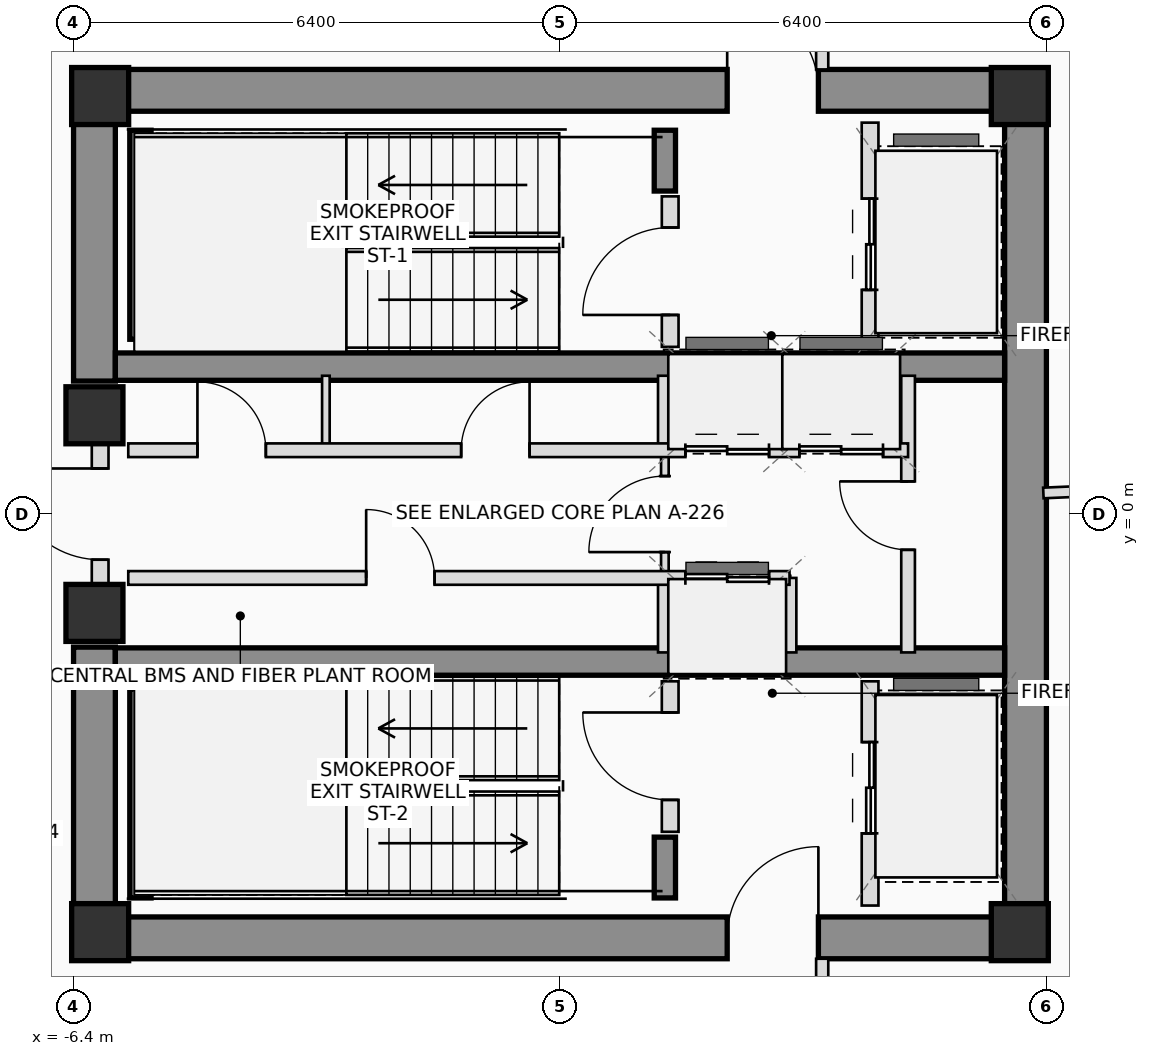
"""IFC4 building model, lengths in metres.
Left out: names, types, materials, properties, quantities, classifications, styles, units other than length and angle.
Written with IfcOpenShell. Run it as: python <this file> out.ifc"""

import sys

from ifc_helpers import new_model, si_unit, direction, frame, frame_2d, origin, origin_2d, place, context, subcontext, project, spatial, rectangle, extrude, source, transform, mapped, element, fill, save


model = new_model("IFC4")
c1 = context("Model", 3, precision=1e-05, world=origin(), true_north=direction((0.0, 1.0)))
c2 = subcontext(c1, "Body", "Model", "MODEL_VIEW")
j1 = project(units=[si_unit("LENGTHUNIT", "METRE"), si_unit("PLANEANGLEUNIT", "RADIAN")], contexts=[c1])
p1 = place(None, origin())
s1 = spatial("IfcSite", under=j1, at=p1, CompositionType="ELEMENT")
p2 = place(p1, origin())
s2 = spatial("IfcBuilding", under=s1, at=p2, CompositionType="ELEMENT")
p3 = place(p2, frame((0.0, 0.0, 281.35)))
s3 = spatial("IfcBuildingStorey", under=s2, at=p3, CompositionType="ELEMENT", Elevation=281.35)
m1 = source(origin(), c2, "Body", "SweptSolid", [
    extrude(rectangle(XDim=0.75, YDim=0.75, at=origin_2d()), origin(), (0.0, 0.0, 1.0), 3.4),
])
for number, where, z_axis, x_axis in (
    (1, (-6.05, -5.5, 0.0), (0.0, 0.0, 1.0), (1.0, 0.0, 0.0)),
    (2, (6.05, -5.5, 0.0), (0.0, 0.0, 1.0), (1.0, 0.0, 0.0)),
    (3, (6.05, 5.5, 0.0), (0.0, 0.0, 1.0), (1.0, 0.0, 0.0)),
    (4, (-6.05, 5.5, 0.0), (0.0, 0.0, 1.0), (1.0, 0.0, 0.0)),
):
    element("IfcColumn", number, at=place(p3, frame(where, z_axis=z_axis, x_axis=x_axis)), inside=s3, PredefinedType="COLUMN", context=c2, shape_type="MappedRepresentation", body=[
        mapped(m1, transform((0.0, 0.0, 0.0), scale=1.0)),
    ])
p4 = place(p3, frame((-6.4, 5.575, 0.0), z_axis=(0.0, 0.0, 1.0), x_axis=(1.0, 0.0, 0.0)))
e5 = element("IfcWall", 5, at=p4, inside=s3, PredefinedType="SHEAR", context=c2, shape_type="SweptSolid", body=[
    extrude(rectangle(XDim=12.8, YDim=0.55, at=frame_2d((6.4, 0.0))), origin(), (0.0, 0.0, 1.0), 3.4),
])
p5 = place(p4, frame((8.6, 0.0, 0.0)))
e6 = element("IfcOpeningElement", 6, at=p5, cuts=e5, PredefinedType="OPENING", context=c2, shape_type="SweptSolid", body=[
    extrude(rectangle(XDim=1.2, YDim=2.2, at=frame_2d((0.6, 1.1))), frame((0.0, 0.285, 0.0), z_axis=(0.0, -1.0, 0.0), x_axis=(1.0, 0.0, 0.0)), (0.0, 0.0, 1.0), 0.57),
])
p6 = place(p3, frame((-6.4, -5.575, 0.0), z_axis=(0.0, 0.0, 1.0), x_axis=(1.0, 0.0, 0.0)))
e7 = element("IfcWall", 7, at=p6, inside=s3, PredefinedType="SHEAR", context=c2, shape_type="SweptSolid", body=[
    extrude(rectangle(XDim=12.8, YDim=0.55, at=frame_2d((6.4, 0.0))), origin(), (0.0, 0.0, 1.0), 3.4),
])
p7 = place(p6, frame((8.6, 0.0, 0.0)))
e8 = element("IfcOpeningElement", 8, at=p7, cuts=e7, PredefinedType="OPENING", context=c2, shape_type="SweptSolid", body=[
    extrude(rectangle(XDim=1.2, YDim=2.2, at=frame_2d((0.6, 1.1))), frame((0.0, 0.285, 0.0), z_axis=(0.0, -1.0, 0.0), x_axis=(1.0, 0.0, 0.0)), (0.0, 0.0, 1.0), 0.57),
])
p8 = place(p3, frame((6.125, -5.3, 0.0), z_axis=(0.0, 0.0, 1.0), x_axis=(0.0, 1.0, 0.0)))
e9 = element("IfcWall", 9, at=p8, inside=s3, PredefinedType="SHEAR", context=c2, shape_type="SweptSolid", body=[
    extrude(rectangle(XDim=10.6, YDim=0.55, at=frame_2d((5.3, 0.0))), origin(), (0.0, 0.0, 1.0), 3.4),
])
for number, where, z_axis, x_axis in (
    (10, (-6.125, -5.3, 0.0), (0.0, 0.0, 1.0), (0.0, 1.0, 0.0)),
    (11, (-6.125, 1.75, 0.0), (0.0, 0.0, 1.0), (0.0, 1.0, 0.0)),
):
    element("IfcWall", number, at=place(p3, frame(where, z_axis=z_axis, x_axis=x_axis)), inside=s3, PredefinedType="SHEAR", context=c2, shape_type="SweptSolid", body=[
        extrude(rectangle(XDim=3.55, YDim=0.55, at=frame_2d((1.775, 0.0))), origin(), (0.0, 0.0, 1.0), 3.4),
    ])
for number, where, z_axis, x_axis in (
    (12, (-5.85, 1.94, 0.0), (0.0, 0.0, 1.0), (1.0, 0.0, 0.0)),
    (13, (-5.85, -1.94, 0.0), (0.0, 0.0, 1.0), (1.0, 0.0, 0.0)),
):
    element("IfcWall", number, at=place(p3, frame(where, z_axis=z_axis, x_axis=x_axis)), inside=s3, PredefinedType="SHEAR", context=c2, shape_type="SweptSolid", body=[
        extrude(rectangle(XDim=11.7, YDim=0.36, at=frame_2d((5.85, 0.0))), origin(), (0.0, 0.0, 1.0), 3.4),
    ])
p9 = place(p3, frame((-5.52, 2.3, 0.0), z_axis=(0.0, 0.0, 1.0), x_axis=(0.0, 1.0, 0.0)))
e14 = element("IfcWall", 14, at=p9, inside=s3, PredefinedType="SHEAR", context=c2, shape_type="SweptSolid", body=[
    extrude(rectangle(XDim=2.75, YDim=0.28, at=frame_2d((1.375, 0.0))), origin(), (0.0, 0.0, 1.0), 3.4),
])
p10 = place(p3, frame((1.38, 4.25, 0.0), z_axis=(0.0, 0.0, 1.0), x_axis=(0.0, 1.0, 0.0)))
e15 = element("IfcWall", 15, at=p10, inside=s3, PredefinedType="SHEAR", context=c2, shape_type="SweptSolid", body=[
    extrude(rectangle(XDim=0.8, YDim=0.28, at=frame_2d((0.4, 0.0))), origin(), (0.0, 0.0, 1.0), 3.4),
])
p11 = place(p3, frame((-5.52, -5.05, 0.0), z_axis=(0.0, 0.0, 1.0), x_axis=(0.0, 1.0, 0.0)))
e16 = element("IfcWall", 16, at=p11, inside=s3, PredefinedType="SHEAR", context=c2, shape_type="SweptSolid", body=[
    extrude(rectangle(XDim=2.75, YDim=0.28, at=frame_2d((1.375, 0.0))), origin(), (0.0, 0.0, 1.0), 3.4),
])
p12 = place(p3, frame((1.38, -5.05, 0.0), z_axis=(0.0, 0.0, 1.0), x_axis=(0.0, 1.0, 0.0)))
e17 = element("IfcWall", 17, at=p12, inside=s3, PredefinedType="SHEAR", context=c2, shape_type="SweptSolid", body=[
    extrude(rectangle(XDim=0.8, YDim=0.28, at=frame_2d((0.4, 0.0))), origin(), (0.0, 0.0, 1.0), 3.4),
])
for number, where, z_axis, x_axis in (
    (18, (-6.125, -1.3, 0.0), (0.0, 0.0, 1.0), (1.0, 0.0, 0.0)),
    (19, (-6.125, 1.3, 0.0), (0.0, 0.0, 1.0), (1.0, 0.0, 0.0)),
):
    element("IfcColumn", number, at=place(p3, frame(where, z_axis=z_axis, x_axis=x_axis)), inside=s3, PredefinedType="COLUMN", context=c2, shape_type="MappedRepresentation", body=[
        mapped(m1, transform((0.0, 0.0, 0.0), scale=1.0)),
    ])
p13 = place(p3, frame((-6.05, -0.95, 0.0), z_axis=(0.0, 0.0, 1.0), x_axis=(0.0, 1.0, 0.0)))
e20 = element("IfcWall", 20, at=p13, inside=s3, PredefinedType="PLUMBINGWALL", context=c2, shape_type="SweptSolid", body=[
    extrude(rectangle(XDim=1.9, YDim=0.22, at=frame_2d((0.95, 0.0))), origin(), (0.0, 0.0, 1.0), 2.14),
])
p14 = place(p13, frame((0.35, 0.0, 0.0)))
e21 = element("IfcOpeningElement", 21, at=p14, cuts=e20, PredefinedType="OPENING", context=c2, shape_type="SweptSolid", body=[
    extrude(rectangle(XDim=1.2, YDim=2.2, at=frame_2d((0.6, 1.1))), frame((0.0, 0.12, 0.0), z_axis=(0.0, -1.0, 0.0), x_axis=(1.0, 0.0, 0.0)), (0.0, 0.0, 1.0), 0.24),
])
p15 = place(p3, frame((1.45, 2.2, 0.0), z_axis=(0.0, 0.0, 1.0), x_axis=(0.0, 1.0, 0.0)))
e22 = element("IfcWall", 22, at=p15, inside=s3, PredefinedType="PLUMBINGWALL", context=c2, shape_type="SweptSolid", body=[
    extrude(rectangle(XDim=1.98, YDim=0.22, at=frame_2d((0.99, 0.0))), origin(), (0.0, 0.0, 1.0), 3.16),
])
p16 = place(p15, frame((0.42, 0.0, 0.0)))
e23 = element("IfcOpeningElement", 23, at=p16, cuts=e22, PredefinedType="OPENING", context=c2, shape_type="SweptSolid", body=[
    extrude(rectangle(XDim=1.15, YDim=2.15, at=frame_2d((0.575, 1.075))), frame((0.0, 0.12, 0.0), z_axis=(0.0, -1.0, 0.0), x_axis=(1.0, 0.0, 0.0)), (0.0, 0.0, 1.0), 0.24),
])
p17 = place(p3, frame((4.08, 2.2, 0.0), z_axis=(0.0, 0.0, 1.0), x_axis=(0.0, 1.0, 0.0)))
e24 = element("IfcWall", 24, at=p17, inside=s3, PredefinedType="PLUMBINGWALL", context=c2, shape_type="SweptSolid", body=[
    extrude(rectangle(XDim=2.95, YDim=0.22, at=frame_2d((1.475, 0.0))), origin(), (0.0, 0.0, 1.0), 3.16),
])
p18 = place(p17, frame((0.75, 0.0, 0.0)))
e25 = element("IfcOpeningElement", 25, at=p18, cuts=e24, PredefinedType="OPENING", context=c2, shape_type="SweptSolid", body=[
    extrude(rectangle(XDim=1.2, YDim=2.25, at=frame_2d((0.6, 1.125))), frame((0.0, 0.12, 0.0), z_axis=(0.0, -1.0, 0.0), x_axis=(1.0, 0.0, 0.0)), (0.0, 0.0, 1.0), 0.24),
])
p19 = place(p3, frame((1.45, -4.18, 0.0), z_axis=(0.0, 0.0, 1.0), x_axis=(0.0, 1.0, 0.0)))
e26 = element("IfcWall", 26, at=p19, inside=s3, PredefinedType="PLUMBINGWALL", context=c2, shape_type="SweptSolid", body=[
    extrude(rectangle(XDim=1.98, YDim=0.22, at=frame_2d((0.99, 0.0))), origin(), (0.0, 0.0, 1.0), 3.16),
])
p20 = place(p19, frame((0.42, 0.0, 0.0)))
e27 = element("IfcOpeningElement", 27, at=p20, cuts=e26, PredefinedType="OPENING", context=c2, shape_type="SweptSolid", body=[
    extrude(rectangle(XDim=1.15, YDim=2.15, at=frame_2d((0.575, 1.075))), frame((0.0, 0.12, 0.0), z_axis=(0.0, -1.0, 0.0), x_axis=(1.0, 0.0, 0.0)), (0.0, 0.0, 1.0), 0.24),
])
p21 = place(p3, frame((4.08, -5.15, 0.0), z_axis=(0.0, 0.0, 1.0), x_axis=(0.0, 1.0, 0.0)))
e28 = element("IfcWall", 28, at=p21, inside=s3, PredefinedType="PLUMBINGWALL", context=c2, shape_type="SweptSolid", body=[
    extrude(rectangle(XDim=2.95, YDim=0.22, at=frame_2d((1.475, 0.0))), origin(), (0.0, 0.0, 1.0), 3.16),
])
p22 = place(p21, frame((0.95, 0.0, 0.0)))
e29 = element("IfcOpeningElement", 29, at=p22, cuts=e28, PredefinedType="OPENING", context=c2, shape_type="SweptSolid", body=[
    extrude(rectangle(XDim=1.2, YDim=2.25, at=frame_2d((0.6, 1.125))), frame((0.0, 0.12, 0.0), z_axis=(0.0, -1.0, 0.0), x_axis=(1.0, 0.0, 0.0)), (0.0, 0.0, 1.0), 0.24),
])
p23 = place(p3, frame((1.38, -0.84, 0.0), z_axis=(0.0, 0.0, 1.0), x_axis=(0.0, 1.0, 0.0)))
e30 = element("IfcWall", 30, at=p23, inside=s3, PredefinedType="PARTITIONING", context=c2, shape_type="SweptSolid", body=[
    extrude(rectangle(XDim=1.68, YDim=0.1, at=frame_2d((0.84, 0.0))), origin(), (0.0, 0.0, 1.0), 3.16),
])
p24 = place(p23, frame((0.34, 0.0, 0.0)))
e31 = element("IfcOpeningElement", 31, at=p24, cuts=e30, PredefinedType="OPENING", context=c2, shape_type="SweptSolid", body=[
    extrude(rectangle(XDim=1.0, YDim=2.25, at=frame_2d((0.5, 1.125))), frame((0.0, 0.06, 0.0), z_axis=(0.0, -1.0, 0.0), x_axis=(1.0, 0.0, 0.0)), (0.0, 0.0, 1.0), 0.12),
])
p25 = place(p3, frame((-3.08, 0.84, 0.0), z_axis=(0.0, 0.0, 1.0), x_axis=(0.0, 1.0, 0.0)))
e32 = element("IfcWall", 32, at=p25, inside=s3, PredefinedType="PARTITIONING", context=c2, shape_type="SweptSolid", body=[
    extrude(rectangle(XDim=0.98, YDim=0.1, at=frame_2d((0.49, 0.0))), origin(), (0.0, 0.0, 1.0), 3.16),
])
for number, where, z_axis, x_axis in (
    (33, (1.38, 0.84, 0.0), (0.0, 0.0, 1.0), (0.0, 1.0, 0.0)),
    (34, (1.38, -1.82, 0.0), (0.0, 0.0, 1.0), (0.0, 1.0, 0.0)),
    (35, (3.02, 0.84, 0.0), (0.0, 0.0, 1.0), (0.0, 1.0, 0.0)),
    (36, (4.38, 0.84, 0.0), (0.0, 0.0, 1.0), (0.0, 1.0, 0.0)),
    (37, (3.02, -1.82, 0.0), (0.0, 0.0, 1.0), (0.0, 1.0, 0.0)),
):
    element("IfcWall", number, at=place(p3, frame(where, z_axis=z_axis, x_axis=x_axis)), inside=s3, PredefinedType="PLUMBINGWALL", context=c2, shape_type="SweptSolid", body=[
        extrude(rectangle(XDim=0.98, YDim=0.18, at=frame_2d((0.49, 0.0))), origin(), (0.0, 0.0, 1.0), 3.16),
    ])
p26 = place(p3, frame((4.58, -1.82, 0.0), z_axis=(0.0, 0.0, 1.0), x_axis=(0.0, 1.0, 0.0)))
e38 = element("IfcWall", 38, at=p26, inside=s3, PredefinedType="PLUMBINGWALL", context=c2, shape_type="SweptSolid", body=[
    extrude(rectangle(XDim=3.64, YDim=0.18, at=frame_2d((1.82, 0.0))), origin(), (0.0, 0.0, 1.0), 3.16),
])
p27 = place(p26, frame((1.35, 0.0, 0.0)))
e39 = element("IfcOpeningElement", 39, at=p27, cuts=e38, PredefinedType="OPENING", context=c2, shape_type="SweptSolid", body=[
    extrude(rectangle(XDim=0.9, YDim=2.05, at=frame_2d((0.45, 1.025))), frame((0.0, 0.1, 0.0), z_axis=(0.0, -1.0, 0.0), x_axis=(1.0, 0.0, 0.0)), (0.0, 0.0, 1.0), 0.2),
])
p28 = place(p3, frame((-5.68, 0.84, 0.0), z_axis=(0.0, 0.0, 1.0), x_axis=(1.0, 0.0, 0.0)))
e40 = element("IfcWall", 40, at=p28, inside=s3, PredefinedType="PLUMBINGWALL", context=c2, shape_type="SweptSolid", body=[
    extrude(rectangle(XDim=10.26, YDim=0.18, at=frame_2d((5.13, 0.0))), origin(), (0.0, 0.0, 1.0), 3.16),
])
p29 = place(p28, frame((0.91, 0.0, 0.0)))
e41 = element("IfcOpeningElement", 41, at=p29, cuts=e40, PredefinedType="OPENING", context=c2, shape_type="SweptSolid", body=[
    extrude(rectangle(XDim=0.9, YDim=2.05, at=frame_2d((0.45, 1.025))), frame((0.0, 0.1, 0.0), z_axis=(0.0, -1.0, 0.0), x_axis=(1.0, 0.0, 0.0)), (0.0, 0.0, 1.0), 0.2),
])
p30 = place(p28, frame((4.38, 0.0, 0.0)))
e42 = element("IfcOpeningElement", 42, at=p30, cuts=e40, PredefinedType="OPENING", context=c2, shape_type="SweptSolid", body=[
    extrude(rectangle(XDim=0.9, YDim=2.05, at=frame_2d((0.45, 1.025))), frame((0.0, 0.1, 0.0), z_axis=(0.0, -1.0, 0.0), x_axis=(1.0, 0.0, 0.0)), (0.0, 0.0, 1.0), 0.2),
])
p31 = place(p28, frame((7.33, 0.0, 0.0)))
e43 = element("IfcOpeningElement", 43, at=p31, cuts=e40, PredefinedType="OPENING", context=c2, shape_type="SweptSolid", body=[
    extrude(rectangle(XDim=1.1, YDim=2.2, at=frame_2d((0.55, 1.1))), frame((0.0, 0.1, 0.0), z_axis=(0.0, -1.0, 0.0), x_axis=(1.0, 0.0, 0.0)), (0.0, 0.0, 1.0), 0.2),
])
p32 = place(p28, frame((8.83, 0.0, 0.0)))
e44 = element("IfcOpeningElement", 44, at=p32, cuts=e40, PredefinedType="OPENING", context=c2, shape_type="SweptSolid", body=[
    extrude(rectangle(XDim=1.1, YDim=2.2, at=frame_2d((0.55, 1.1))), frame((0.0, 0.1, 0.0), z_axis=(0.0, -1.0, 0.0), x_axis=(1.0, 0.0, 0.0)), (0.0, 0.0, 1.0), 0.2),
])
p33 = place(p3, frame((-5.68, -0.84, 0.0), z_axis=(0.0, 0.0, 1.0), x_axis=(1.0, 0.0, 0.0)))
e45 = element("IfcWall", 45, at=p33, inside=s3, PredefinedType="PLUMBINGWALL", context=c2, shape_type="SweptSolid", body=[
    extrude(rectangle(XDim=8.7, YDim=0.18, at=frame_2d((4.35, 0.0))), origin(), (0.0, 0.0, 1.0), 3.16),
])
p34 = place(p33, frame((3.13, 0.0, 0.0)))
e46 = element("IfcOpeningElement", 46, at=p34, cuts=e45, PredefinedType="OPENING", context=c2, shape_type="SweptSolid", body=[
    extrude(rectangle(XDim=0.9, YDim=2.05, at=frame_2d((0.45, 1.025))), frame((0.0, 0.1, 0.0), z_axis=(0.0, -1.0, 0.0), x_axis=(1.0, 0.0, 0.0)), (0.0, 0.0, 1.0), 0.2),
])
p35 = place(p33, frame((7.33, 0.0, 0.0)))
e47 = element("IfcOpeningElement", 47, at=p35, cuts=e45, PredefinedType="OPENING", context=c2, shape_type="SweptSolid", body=[
    extrude(rectangle(XDim=1.1, YDim=2.2, at=frame_2d((0.55, 1.1))), frame((0.0, 0.1, 0.0), z_axis=(0.0, -1.0, 0.0), x_axis=(1.0, 0.0, 0.0)), (0.0, 0.0, 1.0), 0.2),
])
p36 = place(p3, frame((3.45, 7.49, 0.0), z_axis=(0.0, 0.0, 1.0), x_axis=(0.0, -1.0, 0.0)))
e48 = element("IfcWall", 48, at=p36, inside=s3, PredefinedType="PARTITIONING", context=c2, shape_type="SweptSolid", body=[
    extrude(rectangle(XDim=1.64, YDim=0.16, at=frame_2d((0.82, 0.0))), origin(), (0.0, 0.0, 1.0), 2.765),
])
p37 = place(p3, frame((3.45, -5.85, 0.0), z_axis=(0.0, 0.0, 1.0), x_axis=(0.0, -1.0, 0.0)))
e49 = element("IfcWall", 49, at=p37, inside=s3, PredefinedType="PARTITIONING", context=c2, shape_type="SweptSolid", body=[
    extrude(rectangle(XDim=1.64, YDim=0.16, at=frame_2d((0.82, 0.0))), origin(), (0.0, 0.0, 1.0), 3.16),
])
p38 = place(p37, frame((0.32, 0.0, 0.0)))
e50 = element("IfcOpeningElement", 50, at=p38, cuts=e49, PredefinedType="OPENING", context=c2, shape_type="SweptSolid", body=[
    extrude(rectangle(XDim=1.0, YDim=2.25, at=frame_2d((0.5, 1.125))), frame((0.0, 0.09, 0.0), z_axis=(0.0, -1.0, 0.0), x_axis=(1.0, 0.0, 0.0)), (0.0, 0.0, 1.0), 0.18),
])
p39 = place(p3, frame((6.36, 0.278, 0.0), z_axis=(0.0, 0.0, 1.0), x_axis=(0.999047617824, 0.043633213494, 0.0)))
e51 = element("IfcWall", 51, at=p39, inside=s3, PredefinedType="PARTITIONING", context=c2, shape_type="SweptSolid", body=[
    extrude(rectangle(XDim=13.406, YDim=0.14, at=frame_2d((6.703, 0.0))), origin(), (0.0, 0.0, 1.0), 2.565),
])
p40 = place(p5, origin())
e52 = element("IfcDoor", 52, at=p40, inside=s3, OperationType="SINGLE_SWING_LEFT", PredefinedType="DOOR", context=c2, shape_type="SweptSolid", body=[
    extrude(rectangle(XDim=1.2, YDim=2.2, at=frame_2d((0.6, 1.1))), frame((0.0, 0.025, 0.0), z_axis=(0.0, -1.0, 0.0), x_axis=(1.0, 0.0, 0.0)), (0.0, 0.0, 1.0), 0.05),
])
fill(e6, e52)
p41 = place(p7, origin())
e53 = element("IfcDoor", 53, at=p41, inside=s3, OperationType="SINGLE_SWING_RIGHT", PredefinedType="DOOR", context=c2, shape_type="SweptSolid", body=[
    extrude(rectangle(XDim=1.2, YDim=2.2, at=frame_2d((0.6, 1.1))), frame((0.0, 0.025, 0.0), z_axis=(0.0, -1.0, 0.0), x_axis=(1.0, 0.0, 0.0)), (0.0, 0.0, 1.0), 0.05),
])
fill(e8, e53)
p42 = place(p14, origin())
e54 = element("IfcDoor", 54, at=p42, inside=s3, OperationType="SINGLE_SWING_RIGHT", PredefinedType="DOOR", context=c2, shape_type="SweptSolid", body=[
    extrude(rectangle(XDim=1.2, YDim=2.2, at=frame_2d((0.6, 1.1))), frame((0.0, 0.025, 0.0), z_axis=(0.0, -1.0, 0.0), x_axis=(1.0, 0.0, 0.0)), (0.0, 0.0, 1.0), 0.05),
])
fill(e21, e54)
p43 = place(p16, origin())
e55 = element("IfcDoor", 55, at=p43, inside=s3, OperationType="SINGLE_SWING_LEFT", PredefinedType="DOOR", context=c2, shape_type="SweptSolid", body=[
    extrude(rectangle(XDim=1.15, YDim=2.15, at=frame_2d((0.575, 1.075))), frame((0.0, 0.025, 0.0), z_axis=(0.0, -1.0, 0.0), x_axis=(1.0, 0.0, 0.0)), (0.0, 0.0, 1.0), 0.05),
])
fill(e23, e55)
p44 = place(p18, origin())
e56 = element("IfcDoor", 56, at=p44, inside=s3, OperationType="DOUBLE_DOOR_SLIDING", PredefinedType="DOOR", context=c2, shape_type="SweptSolid", body=[
    extrude(rectangle(XDim=1.2, YDim=2.25, at=frame_2d((0.6, 1.125))), frame((0.0, 0.025, 0.0), z_axis=(0.0, -1.0, 0.0), x_axis=(1.0, 0.0, 0.0)), (0.0, 0.0, 1.0), 0.05),
])
fill(e25, e56)
p45 = place(p20, origin())
e57 = element("IfcDoor", 57, at=p45, inside=s3, OperationType="SINGLE_SWING_RIGHT", PredefinedType="DOOR", context=c2, shape_type="SweptSolid", body=[
    extrude(rectangle(XDim=1.15, YDim=2.15, at=frame_2d((0.575, 1.075))), frame((0.0, 0.025, 0.0), z_axis=(0.0, -1.0, 0.0), x_axis=(1.0, 0.0, 0.0)), (0.0, 0.0, 1.0), 0.05),
])
fill(e27, e57)
p46 = place(p22, origin())
e58 = element("IfcDoor", 58, at=p46, inside=s3, OperationType="DOUBLE_DOOR_SLIDING", PredefinedType="DOOR", context=c2, shape_type="SweptSolid", body=[
    extrude(rectangle(XDim=1.2, YDim=2.25, at=frame_2d((0.6, 1.125))), frame((0.0, 0.025, 0.0), z_axis=(0.0, -1.0, 0.0), x_axis=(1.0, 0.0, 0.0)), (0.0, 0.0, 1.0), 0.05),
])
fill(e29, e58)
p47 = place(p24, origin())
e59 = element("IfcDoor", 59, at=p47, inside=s3, OperationType="SINGLE_SWING_LEFT", PredefinedType="DOOR", context=c2, shape_type="SweptSolid", body=[
    extrude(rectangle(XDim=1.0, YDim=2.25, at=frame_2d((0.5, 1.125))), frame((0.0, 0.025, 0.0), z_axis=(0.0, -1.0, 0.0), x_axis=(1.0, 0.0, 0.0)), (0.0, 0.0, 1.0), 0.05),
])
fill(e31, e59)
p48 = place(p27, origin())
e60 = element("IfcDoor", 60, at=p48, inside=s3, OperationType="SINGLE_SWING_RIGHT", PredefinedType="DOOR", context=c2, shape_type="SweptSolid", body=[
    extrude(rectangle(XDim=0.9, YDim=2.05, at=frame_2d((0.45, 1.025))), frame((0.0, 0.025, 0.0), z_axis=(0.0, -1.0, 0.0), x_axis=(1.0, 0.0, 0.0)), (0.0, 0.0, 1.0), 0.05),
])
fill(e39, e60)
p49 = place(p29, origin())
e61 = element("IfcDoor", 61, at=p49, inside=s3, OperationType="SINGLE_SWING_LEFT", PredefinedType="DOOR", context=c2, shape_type="SweptSolid", body=[
    extrude(rectangle(XDim=0.9, YDim=2.05, at=frame_2d((0.45, 1.025))), frame((0.0, 0.025, 0.0), z_axis=(0.0, -1.0, 0.0), x_axis=(1.0, 0.0, 0.0)), (0.0, 0.0, 1.0), 0.05),
])
fill(e41, e61)
p50 = place(p30, origin())
e62 = element("IfcDoor", 62, at=p50, inside=s3, OperationType="SINGLE_SWING_RIGHT", PredefinedType="DOOR", context=c2, shape_type="SweptSolid", body=[
    extrude(rectangle(XDim=0.9, YDim=2.05, at=frame_2d((0.45, 1.025))), frame((0.0, 0.025, 0.0), z_axis=(0.0, -1.0, 0.0), x_axis=(1.0, 0.0, 0.0)), (0.0, 0.0, 1.0), 0.05),
])
fill(e42, e62)
p51 = place(p31, origin())
e63 = element("IfcDoor", 63, at=p51, inside=s3, OperationType="DOUBLE_DOOR_SLIDING", PredefinedType="DOOR", context=c2, shape_type="SweptSolid", body=[
    extrude(rectangle(XDim=1.1, YDim=2.2, at=frame_2d((0.55, 1.1))), frame((0.0, 0.025, 0.0), z_axis=(0.0, -1.0, 0.0), x_axis=(1.0, 0.0, 0.0)), (0.0, 0.0, 1.0), 0.05),
])
fill(e43, e63)
p52 = place(p32, origin())
e64 = element("IfcDoor", 64, at=p52, inside=s3, OperationType="DOUBLE_DOOR_SLIDING", PredefinedType="DOOR", context=c2, shape_type="SweptSolid", body=[
    extrude(rectangle(XDim=1.1, YDim=2.2, at=frame_2d((0.55, 1.1))), frame((0.0, 0.025, 0.0), z_axis=(0.0, -1.0, 0.0), x_axis=(1.0, 0.0, 0.0)), (0.0, 0.0, 1.0), 0.05),
])
fill(e44, e64)
p53 = place(p34, origin())
e65 = element("IfcDoor", 65, at=p53, inside=s3, OperationType="SINGLE_SWING_LEFT", PredefinedType="DOOR", context=c2, shape_type="SweptSolid", body=[
    extrude(rectangle(XDim=0.9, YDim=2.05, at=frame_2d((0.45, 1.025))), frame((0.0, 0.025, 0.0), z_axis=(0.0, -1.0, 0.0), x_axis=(1.0, 0.0, 0.0)), (0.0, 0.0, 1.0), 0.05),
])
fill(e46, e65)
p54 = place(p35, origin())
e66 = element("IfcDoor", 66, at=p54, inside=s3, OperationType="DOUBLE_DOOR_SLIDING", PredefinedType="DOOR", context=c2, shape_type="SweptSolid", body=[
    extrude(rectangle(XDim=1.1, YDim=2.2, at=frame_2d((0.55, 1.1))), frame((0.0, 0.025, 0.0), z_axis=(0.0, -1.0, 0.0), x_axis=(1.0, 0.0, 0.0)), (0.0, 0.0, 1.0), 0.05),
])
fill(e47, e66)
save(model, sys.argv[1])
